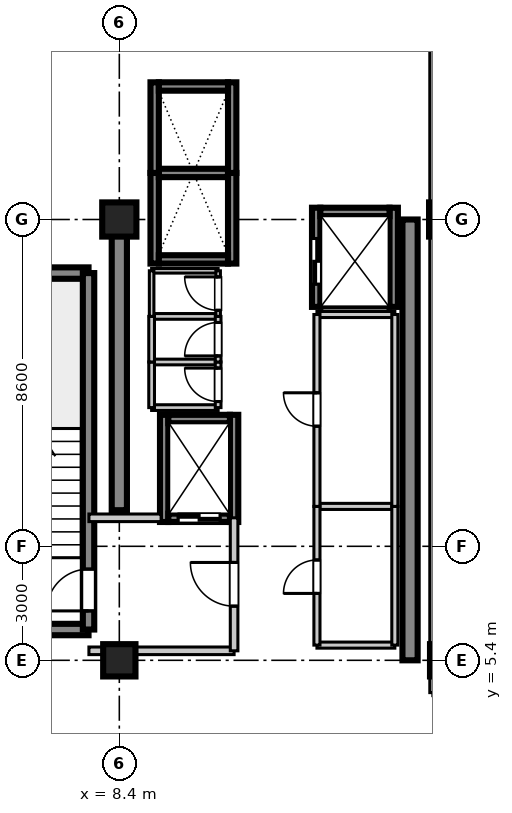
"""IFC4 building model, lengths in metres.
Left out: names, types, materials, properties, quantities, classifications, styles, units other than length and angle.
Written with IfcOpenShell. Run it as: python <this file> out.ifc"""

import sys

from ifc_helpers import new_model, si_unit, direction, frame, frame_2d, origin, origin_2d, place, context, subcontext, project, spatial, rectangle, extrude, source, transform, mapped, element, fill, save


model = new_model("IFC4")
c1 = context("Model", 3, precision=1e-05, world=origin(), true_north=direction((0.0, 1.0)))
c2 = subcontext(c1, "Body", "Model", "MODEL_VIEW")
j1 = project(units=[si_unit("LENGTHUNIT", "METRE"), si_unit("PLANEANGLEUNIT", "RADIAN")], contexts=[c1])
p1 = place(None, origin())
s1 = spatial("IfcSite", under=j1, at=p1, CompositionType="ELEMENT")
p2 = place(p1, origin())
s2 = spatial("IfcBuilding", under=s1, at=p2, CompositionType="ELEMENT")
p3 = place(p2, frame((0.0, 0.0, 281.3)))
s3 = spatial("IfcBuildingStorey", under=s2, at=p3, CompositionType="ELEMENT", Elevation=281.3)
m1 = source(origin(), c2, "Body", "SweptSolid", [
    extrude(rectangle(XDim=0.85, YDim=0.85, at=origin_2d()), origin(), (0.0, 0.0, 1.0), 3.705),
])
p4 = place(p3, frame((8.4, 5.4, 0.0), z_axis=(0.0, 0.0, 1.0), x_axis=(1.0, 0.0, 0.0)))
e1 = element("IfcColumn", 1, at=p4, inside=s3, PredefinedType="PILASTER", context=c2, shape_type="MappedRepresentation", body=[
    mapped(m1, transform((0.0, 0.0, 0.0), scale=1.0)),
])
m2 = source(origin(), c2, "Body", "SweptSolid", [
    extrude(rectangle(XDim=0.9, YDim=0.9, at=origin_2d()), origin(), (0.0, 0.0, 1.0), 3.705),
])
p5 = place(p3, frame((8.4, 17.0, 0.0), z_axis=(0.0, 0.0, 1.0), x_axis=(1.0, 0.0, 0.0)))
e2 = element("IfcColumn", 2, at=p5, inside=s3, PredefinedType="COLUMN", context=c2, shape_type="MappedRepresentation", body=[
    mapped(m2, transform((0.0, 0.0, 0.0), scale=1.0)),
])
p6 = place(p3, frame((17.0, 5.4, 0.0), z_axis=(0.0, 0.0, 1.0), x_axis=(1.0, 0.0, 0.0)))
e3 = element("IfcColumn", 3, at=p6, inside=s3, PredefinedType="PILASTER", context=c2, shape_type="MappedRepresentation", body=[
    mapped(m1, transform((0.0, 0.0, 0.0), scale=1.0)),
])
p7 = place(p3, frame((17.0, 17.0, 0.0), z_axis=(0.0, 0.0, 1.0), x_axis=(1.0, 0.0, 0.0)))
e4 = element("IfcColumn", 4, at=p7, inside=s3, PredefinedType="COLUMN", context=c2, shape_type="MappedRepresentation", body=[
    mapped(m2, transform((0.0, 0.0, 0.0), scale=1.0)),
])
m3 = source(origin(), c2, "Body", "SweptSolid", [
    extrude(rectangle(XDim=7.65, YDim=0.4, at=frame_2d((3.825, 0.0))), origin(), (0.0, 0.0, 1.0), 3.45),
])
p8 = place(p3, frame((8.4, 9.35, 0.0), z_axis=(0.0, 0.0, 1.0), x_axis=(0.0, 1.0, 0.0)))
e5 = element("IfcWall", 5, at=p8, inside=s3, PredefinedType="SHEAR", context=c2, shape_type="MappedRepresentation", body=[
    mapped(m3, transform((0.0, 0.0, 0.0), scale=1.0)),
])
m4 = source(origin(), c2, "Body", "SweptSolid", [
    extrude(rectangle(XDim=11.6, YDim=0.4, at=frame_2d((5.8, 0.0))), origin(), (0.0, 0.0, 1.0), 3.45),
])
p9 = place(p3, frame((16.05, 5.4, 0.0), z_axis=(0.0, 0.0, 1.0), x_axis=(0.0, 1.0, 0.0)))
e6 = element("IfcWall", 6, at=p9, inside=s3, PredefinedType="SHEAR", context=c2, shape_type="MappedRepresentation", body=[
    mapped(m4, transform((0.0, 0.0, 0.0), scale=1.0)),
])
m5 = source(origin(), c2, "Body", "SweptSolid", [
    extrude(rectangle(XDim=3.98, YDim=0.3, at=frame_2d((1.99, 0.0))), origin(), (0.0, 0.0, 1.0), 3.45),
])
for number, where, z_axis, x_axis in (
    (7, (3.61, 6.21, 0.0), (0.0, 0.0, 1.0), (1.0, 0.0, 0.0)),
    (8, (3.61, 15.59, 0.0), (0.0, 0.0, 1.0), (1.0, 0.0, 0.0)),
):
    element("IfcWall", number, at=place(p3, frame(where, z_axis=z_axis, x_axis=x_axis)), inside=s3, PredefinedType="SHEAR", context=c2, shape_type="MappedRepresentation", body=[
        mapped(m5, transform((0.0, 0.0, 0.0), scale=1.0)),
    ])
m6 = source(origin(), c2, "Body", "SweptSolid", [
    extrude(rectangle(XDim=9.38, YDim=0.3, at=frame_2d((4.69, 0.0))), origin(), (0.0, 0.0, 1.0), 3.45),
])
p10 = place(p3, frame((7.59, 6.21, 0.0), z_axis=(0.0, 0.0, 1.0), x_axis=(0.0, 1.0, 0.0)))
e9 = element("IfcWall", 9, at=p10, inside=s3, PredefinedType="SHEAR", context=c2, shape_type="MappedRepresentation", body=[
    mapped(m6, transform((0.0, 0.0, 0.0), scale=1.0)),
])
p11 = place(p10, frame((0.49, 0.0, 0.0)))
e10 = element("IfcOpeningElement", 10, at=p11, cuts=e9, PredefinedType="OPENING", context=c2, shape_type="SweptSolid", body=[
    extrude(rectangle(XDim=1.1, YDim=2.15, at=frame_2d((0.55, 1.075))), frame((0.0, 0.16, 0.0), z_axis=(0.0, -1.0, 0.0), x_axis=(1.0, 0.0, 0.0)), (0.0, 0.0, 1.0), 0.32),
])
m7 = source(origin(), c2, "Body", "SweptSolid", [
    extrude(rectangle(XDim=2.385, YDim=0.22, at=frame_2d((1.192, 0.0))), origin(), (0.0, 0.0, 1.0), 3.45),
])
for number, where, z_axis, x_axis in (
    (11, (9.33, 15.84, 0.0), (0.0, 0.0, 1.0), (0.0, 1.0, 0.0)),
    (12, (11.37, 15.84, 0.0), (0.0, 0.0, 1.0), (0.0, 1.0, 0.0)),
):
    element("IfcWall", number, at=place(p3, frame(where, z_axis=z_axis, x_axis=x_axis)), inside=s3, PredefinedType="SHEAR", context=c2, shape_type="MappedRepresentation", body=[
        mapped(m7, transform((0.0, 0.0, 0.0), scale=1.0)),
    ])
m8 = source(origin(), c2, "Body", "SweptSolid", [
    extrude(rectangle(XDim=1.82, YDim=0.22, at=frame_2d((0.91, 0.0))), origin(), (0.0, 0.0, 1.0), 3.45),
])
p12 = place(p3, frame((9.44, 15.95, 0.0), z_axis=(0.0, 0.0, 1.0), x_axis=(1.0, 0.0, 0.0)))
e13 = element("IfcWall", 13, at=p12, inside=s3, PredefinedType="SHEAR", context=c2, shape_type="MappedRepresentation", body=[
    mapped(m8, transform((0.0, 0.0, 0.0), scale=1.0)),
])
m9 = source(origin(), c2, "Body", "SweptSolid", [
    extrude(rectangle(XDim=1.82, YDim=0.22, at=frame_2d((0.91, 0.0))), origin(), (0.0, 0.0, 1.0), 3.75),
])
p13 = place(p3, frame((9.44, 18.225, 0.0), z_axis=(0.0, 0.0, 1.0), x_axis=(1.0, 0.0, 0.0)))
e14 = element("IfcWall", 14, at=p13, inside=s3, PredefinedType="SHEAR", context=c2, shape_type="MappedRepresentation", body=[
    mapped(m9, transform((0.0, 0.0, 0.0), scale=1.0)),
])
for number, where, z_axis, x_axis in (
    (15, (9.33, 18.225, 0.0), (0.0, 0.0, 1.0), (0.0, 1.0, 0.0)),
    (16, (11.37, 18.225, 0.0), (0.0, 0.0, 1.0), (0.0, 1.0, 0.0)),
):
    element("IfcWall", number, at=place(p3, frame(where, z_axis=z_axis, x_axis=x_axis)), inside=s3, PredefinedType="SHEAR", context=c2, shape_type="MappedRepresentation", body=[
        mapped(m7, transform((0.0, 0.0, 0.0), scale=1.0)),
    ])
p14 = place(p3, frame((9.44, 20.5, 0.0), z_axis=(0.0, 0.0, 1.0), x_axis=(1.0, 0.0, 0.0)))
e17 = element("IfcWall", 17, at=p14, inside=s3, PredefinedType="SHEAR", context=c2, shape_type="MappedRepresentation", body=[
    mapped(m8, transform((0.0, 0.0, 0.0), scale=1.0)),
])
m10 = source(origin(), c2, "Body", "SweptSolid", [
    extrude(rectangle(XDim=2.82, YDim=0.22, at=frame_2d((1.41, 0.0))), origin(), (0.0, 0.0, 1.0), 3.45),
])
for number, where, z_axis, x_axis in (
    (18, (9.58, 9.04, 0.0), (0.0, 0.0, 1.0), (0.0, 1.0, 0.0)),
    (19, (11.42, 9.04, 0.0), (0.0, 0.0, 1.0), (0.0, 1.0, 0.0)),
):
    element("IfcWall", number, at=place(p3, frame(where, z_axis=z_axis, x_axis=x_axis)), inside=s3, PredefinedType="SHEAR", context=c2, shape_type="MappedRepresentation", body=[
        mapped(m10, transform((0.0, 0.0, 0.0), scale=1.0)),
    ])
m11 = source(origin(), c2, "Body", "SweptSolid", [
    extrude(rectangle(XDim=1.62, YDim=0.22, at=frame_2d((0.81, 0.0))), origin(), (0.0, 0.0, 1.0), 3.45),
])
p15 = place(p3, frame((9.69, 9.15, 0.0), z_axis=(0.0, 0.0, 1.0), x_axis=(1.0, 0.0, 0.0)))
e20 = element("IfcWall", 20, at=p15, inside=s3, PredefinedType="SHEAR", context=c2, shape_type="MappedRepresentation", body=[
    mapped(m11, transform((0.0, 0.0, 0.0), scale=1.0)),
])
p16 = place(p15, frame((0.26, 0.0, 0.0)))
e21 = element("IfcOpeningElement", 21, at=p16, cuts=e20, PredefinedType="OPENING", context=c2, shape_type="SweptSolid", body=[
    extrude(rectangle(XDim=1.1, YDim=2.2, at=frame_2d((0.55, 1.1))), frame((0.0, 0.12, 0.0), z_axis=(0.0, -1.0, 0.0), x_axis=(1.0, 0.0, 0.0)), (0.0, 0.0, 1.0), 0.24),
])
p17 = place(p3, frame((9.69, 11.75, 0.0), z_axis=(0.0, 0.0, 1.0), x_axis=(1.0, 0.0, 0.0)))
e22 = element("IfcWall", 22, at=p17, inside=s3, PredefinedType="SHEAR", context=c2, shape_type="MappedRepresentation", body=[
    mapped(m11, transform((0.0, 0.0, 0.0), scale=1.0)),
])
m12 = source(origin(), c2, "Body", "SweptSolid", [
    extrude(rectangle(XDim=2.61, YDim=0.22, at=frame_2d((1.305, 0.0))), origin(), (0.0, 0.0, 1.0), 3.45),
])
p18 = place(p3, frame((13.58, 14.7, 0.0), z_axis=(0.0, 0.0, 1.0), x_axis=(0.0, 1.0, 0.0)))
e23 = element("IfcWall", 23, at=p18, inside=s3, PredefinedType="SHEAR", context=c2, shape_type="MappedRepresentation", body=[
    mapped(m12, transform((0.0, 0.0, 0.0), scale=1.0)),
])
p19 = place(p18, frame((0.6, 0.0, 0.0)))
e24 = element("IfcOpeningElement", 24, at=p19, cuts=e23, PredefinedType="OPENING", context=c2, shape_type="SweptSolid", body=[
    extrude(rectangle(XDim=1.2, YDim=2.2, at=frame_2d((0.6, 1.1))), frame((0.0, 0.12, 0.0), z_axis=(0.0, -1.0, 0.0), x_axis=(1.0, 0.0, 0.0)), (0.0, 0.0, 1.0), 0.24),
])
p20 = place(p3, frame((15.62, 14.7, 0.0), z_axis=(0.0, 0.0, 1.0), x_axis=(0.0, 1.0, 0.0)))
e25 = element("IfcWall", 25, at=p20, inside=s3, PredefinedType="SHEAR", context=c2, shape_type="MappedRepresentation", body=[
    mapped(m12, transform((0.0, 0.0, 0.0), scale=1.0)),
])
p21 = place(p3, frame((13.69, 17.2, 0.0), z_axis=(0.0, 0.0, 1.0), x_axis=(1.0, 0.0, 0.0)))
e26 = element("IfcWall", 26, at=p21, inside=s3, PredefinedType="SHEAR", context=c2, shape_type="MappedRepresentation", body=[
    mapped(m8, transform((0.0, 0.0, 0.0), scale=1.0)),
])
m13 = source(origin(), c2, "Body", "SweptSolid", [
    extrude(rectangle(XDim=3.82, YDim=0.2, at=frame_2d((1.91, 0.0))), origin(), (0.0, 0.0, 1.0), 2.79),
])
p22 = place(p3, frame((7.6, 5.65, 0.0), z_axis=(0.0, 0.0, 1.0), x_axis=(1.0, 0.0, 0.0)))
e27 = element("IfcWall", 27, at=p22, inside=s3, PredefinedType="PARTITIONING", context=c2, shape_type="MappedRepresentation", body=[
    mapped(m13, transform((0.0, 0.0, 0.0), scale=1.0)),
])
m14 = source(origin(), c2, "Body", "SweptSolid", [
    extrude(rectangle(XDim=1.9, YDim=0.2, at=frame_2d((0.95, 0.0))), origin(), (0.0, 0.0, 1.0), 2.79),
])
p23 = place(p3, frame((7.6, 9.15, 0.0), z_axis=(0.0, 0.0, 1.0), x_axis=(1.0, 0.0, 0.0)))
e28 = element("IfcWall", 28, at=p23, inside=s3, PredefinedType="PARTITIONING", context=c2, shape_type="MappedRepresentation", body=[
    mapped(m14, transform((0.0, 0.0, 0.0), scale=1.0)),
])
m15 = source(origin(), c2, "Body", "SweptSolid", [
    extrude(rectangle(XDim=3.5, YDim=0.2, at=frame_2d((1.75, 0.0))), origin(), (0.0, 0.0, 1.0), 2.79),
])
p24 = place(p3, frame((11.42, 5.65, 0.0), z_axis=(0.0, 0.0, 1.0), x_axis=(0.0, 1.0, 0.0)))
e29 = element("IfcWall", 29, at=p24, inside=s3, PredefinedType="PARTITIONING", context=c2, shape_type="MappedRepresentation", body=[
    mapped(m15, transform((0.0, 0.0, 0.0), scale=1.0)),
])
p25 = place(p24, frame((1.175, 0.0, 0.0)))
e30 = element("IfcOpeningElement", 30, at=p25, cuts=e29, PredefinedType="OPENING", context=c2, shape_type="SweptSolid", body=[
    extrude(rectangle(XDim=1.15, YDim=2.15, at=frame_2d((0.575, 1.075))), frame((0.0, 0.11, 0.0), z_axis=(0.0, -1.0, 0.0), x_axis=(1.0, 0.0, 0.0)), (0.0, 0.0, 1.0), 0.22),
])
m16 = source(origin(), c2, "Body", "SweptSolid", [
    extrude(rectangle(XDim=1.75, YDim=0.15, at=frame_2d((0.875, 0.0))), origin(), (0.0, 0.0, 1.0), 2.79),
])
for number, where, z_axis, x_axis in (
    (31, (9.25, 12.05, 0.0), (0.0, 0.0, 1.0), (1.0, 0.0, 0.0)),
    (32, (9.25, 13.25, 0.0), (0.0, 0.0, 1.0), (1.0, 0.0, 0.0)),
):
    element("IfcWall", number, at=place(p3, frame(where, z_axis=z_axis, x_axis=x_axis)), inside=s3, PredefinedType="PARTITIONING", context=c2, shape_type="MappedRepresentation", body=[
        mapped(m16, transform((0.0, 0.0, 0.0), scale=1.0)),
    ])
m17 = source(origin(), c2, "Body", "SweptSolid", [
    extrude(rectangle(XDim=1.2, YDim=0.15, at=frame_2d((0.6, 0.0))), origin(), (0.0, 0.0, 1.0), 2.79),
])
p26 = place(p3, frame((9.25, 12.05, 0.0), z_axis=(0.0, 0.0, 1.0), x_axis=(0.0, 1.0, 0.0)))
e33 = element("IfcWall", 33, at=p26, inside=s3, PredefinedType="PARTITIONING", context=c2, shape_type="MappedRepresentation", body=[
    mapped(m17, transform((0.0, 0.0, 0.0), scale=1.0)),
])
p27 = place(p3, frame((11.0, 12.05, 0.0), z_axis=(0.0, 0.0, 1.0), x_axis=(0.0, 1.0, 0.0)))
e34 = element("IfcWall", 34, at=p27, inside=s3, PredefinedType="PARTITIONING", context=c2, shape_type="MappedRepresentation", body=[
    mapped(m17, transform((0.0, 0.0, 0.0), scale=1.0)),
])
p28 = place(p27, frame((0.16, 0.0, 0.0)))
e35 = element("IfcOpeningElement", 35, at=p28, cuts=e34, PredefinedType="OPENING", context=c2, shape_type="SweptSolid", body=[
    extrude(rectangle(XDim=0.88, YDim=2.1, at=frame_2d((0.44, 1.05))), frame((0.0, 0.085, 0.0), z_axis=(0.0, -1.0, 0.0), x_axis=(1.0, 0.0, 0.0)), (0.0, 0.0, 1.0), 0.17),
])
p29 = place(p3, frame((9.25, 14.45, 0.0), z_axis=(0.0, 0.0, 1.0), x_axis=(1.0, 0.0, 0.0)))
e36 = element("IfcWall", 36, at=p29, inside=s3, PredefinedType="PARTITIONING", context=c2, shape_type="MappedRepresentation", body=[
    mapped(m16, transform((0.0, 0.0, 0.0), scale=1.0)),
])
p30 = place(p3, frame((9.25, 13.25, 0.0), z_axis=(0.0, 0.0, 1.0), x_axis=(0.0, 1.0, 0.0)))
e37 = element("IfcWall", 37, at=p30, inside=s3, PredefinedType="PARTITIONING", context=c2, shape_type="MappedRepresentation", body=[
    mapped(m17, transform((0.0, 0.0, 0.0), scale=1.0)),
])
p31 = place(p3, frame((11.0, 13.25, 0.0), z_axis=(0.0, 0.0, 1.0), x_axis=(0.0, 1.0, 0.0)))
e38 = element("IfcWall", 38, at=p31, inside=s3, PredefinedType="PARTITIONING", context=c2, shape_type="MappedRepresentation", body=[
    mapped(m17, transform((0.0, 0.0, 0.0), scale=1.0)),
])
p32 = place(p31, frame((0.16, 0.0, 0.0)))
e39 = element("IfcOpeningElement", 39, at=p32, cuts=e38, PredefinedType="OPENING", context=c2, shape_type="SweptSolid", body=[
    extrude(rectangle(XDim=0.88, YDim=2.1, at=frame_2d((0.44, 1.05))), frame((0.0, 0.085, 0.0), z_axis=(0.0, -1.0, 0.0), x_axis=(1.0, 0.0, 0.0)), (0.0, 0.0, 1.0), 0.17),
])
m18 = source(origin(), c2, "Body", "SweptSolid", [
    extrude(rectangle(XDim=1.75, YDim=0.12, at=frame_2d((0.875, 0.0))), origin(), (0.0, 0.0, 1.0), 2.79),
])
p33 = place(p3, frame((9.25, 15.65, 0.0), z_axis=(0.0, 0.0, 1.0), x_axis=(1.0, 0.0, 0.0)))
e40 = element("IfcWall", 40, at=p33, inside=s3, PredefinedType="PARTITIONING", context=c2, shape_type="MappedRepresentation", body=[
    mapped(m18, transform((0.0, 0.0, 0.0), scale=1.0)),
])
m19 = source(origin(), c2, "Body", "SweptSolid", [
    extrude(rectangle(XDim=1.2, YDim=0.12, at=frame_2d((0.6, 0.0))), origin(), (0.0, 0.0, 1.0), 2.79),
])
p34 = place(p3, frame((9.25, 14.45, 0.0), z_axis=(0.0, 0.0, 1.0), x_axis=(0.0, 1.0, 0.0)))
e41 = element("IfcWall", 41, at=p34, inside=s3, PredefinedType="PARTITIONING", context=c2, shape_type="MappedRepresentation", body=[
    mapped(m19, transform((0.0, 0.0, 0.0), scale=1.0)),
])
p35 = place(p3, frame((11.0, 14.45, 0.0), z_axis=(0.0, 0.0, 1.0), x_axis=(0.0, 1.0, 0.0)))
e42 = element("IfcWall", 42, at=p35, inside=s3, PredefinedType="PARTITIONING", context=c2, shape_type="MappedRepresentation", body=[
    mapped(m19, transform((0.0, 0.0, 0.0), scale=1.0)),
])
p36 = place(p35, frame((0.16, 0.0, 0.0)))
e43 = element("IfcOpeningElement", 43, at=p36, cuts=e42, PredefinedType="OPENING", context=c2, shape_type="SweptSolid", body=[
    extrude(rectangle(XDim=0.88, YDim=2.1, at=frame_2d((0.44, 1.05))), frame((0.0, 0.07, 0.0), z_axis=(0.0, -1.0, 0.0), x_axis=(1.0, 0.0, 0.0)), (0.0, 0.0, 1.0), 0.14),
])
m20 = source(origin(), c2, "Body", "SweptSolid", [
    extrude(rectangle(XDim=2.05, YDim=0.16, at=frame_2d((1.025, 0.0))), origin(), (0.0, 0.0, 1.0), 2.79),
])
for number, where, z_axis, x_axis in (
    (44, (13.6, 5.8, 0.0), (0.0, 0.0, 1.0), (1.0, 0.0, 0.0)),
    (45, (13.6, 9.45, 0.0), (0.0, 0.0, 1.0), (1.0, 0.0, 0.0)),
):
    element("IfcWall", number, at=place(p3, frame(where, z_axis=z_axis, x_axis=x_axis)), inside=s3, PredefinedType="PARTITIONING", context=c2, shape_type="MappedRepresentation", body=[
        mapped(m20, transform((0.0, 0.0, 0.0), scale=1.0)),
    ])
m21 = source(origin(), c2, "Body", "SweptSolid", [
    extrude(rectangle(XDim=3.65, YDim=0.16, at=frame_2d((1.825, 0.0))), origin(), (0.0, 0.0, 1.0), 2.79),
])
p37 = place(p3, frame((13.6, 5.8, 0.0), z_axis=(0.0, 0.0, 1.0), x_axis=(0.0, 1.0, 0.0)))
e46 = element("IfcWall", 46, at=p37, inside=s3, PredefinedType="PARTITIONING", context=c2, shape_type="MappedRepresentation", body=[
    mapped(m21, transform((0.0, 0.0, 0.0), scale=1.0)),
])
p38 = place(p37, frame((1.36, 0.0, 0.0)))
e47 = element("IfcOpeningElement", 47, at=p38, cuts=e46, PredefinedType="OPENING", context=c2, shape_type="SweptSolid", body=[
    extrude(rectangle(XDim=0.88, YDim=2.1, at=frame_2d((0.44, 1.05))), frame((0.0, 0.09, 0.0), z_axis=(0.0, -1.0, 0.0), x_axis=(1.0, 0.0, 0.0)), (0.0, 0.0, 1.0), 0.18),
])
p39 = place(p3, frame((15.65, 5.8, 0.0), z_axis=(0.0, 0.0, 1.0), x_axis=(0.0, 1.0, 0.0)))
e48 = element("IfcWall", 48, at=p39, inside=s3, PredefinedType="PARTITIONING", context=c2, shape_type="MappedRepresentation", body=[
    mapped(m21, transform((0.0, 0.0, 0.0), scale=1.0)),
])
p40 = place(p3, frame((13.6, 14.5, 0.0), z_axis=(0.0, 0.0, 1.0), x_axis=(1.0, 0.0, 0.0)))
e49 = element("IfcWall", 49, at=p40, inside=s3, PredefinedType="PARTITIONING", context=c2, shape_type="MappedRepresentation", body=[
    mapped(m20, transform((0.0, 0.0, 0.0), scale=1.0)),
])
m22 = source(origin(), c2, "Body", "SweptSolid", [
    extrude(rectangle(XDim=5.05, YDim=0.16, at=frame_2d((2.525, 0.0))), origin(), (0.0, 0.0, 1.0), 2.79),
])
p41 = place(p3, frame((13.6, 9.45, 0.0), z_axis=(0.0, 0.0, 1.0), x_axis=(0.0, 1.0, 0.0)))
e50 = element("IfcWall", 50, at=p41, inside=s3, PredefinedType="PARTITIONING", context=c2, shape_type="MappedRepresentation", body=[
    mapped(m22, transform((0.0, 0.0, 0.0), scale=1.0)),
])
p42 = place(p41, frame((2.11, 0.0, 0.0)))
e51 = element("IfcOpeningElement", 51, at=p42, cuts=e50, PredefinedType="OPENING", context=c2, shape_type="SweptSolid", body=[
    extrude(rectangle(XDim=0.88, YDim=2.1, at=frame_2d((0.44, 1.05))), frame((0.0, 0.09, 0.0), z_axis=(0.0, -1.0, 0.0), x_axis=(1.0, 0.0, 0.0)), (0.0, 0.0, 1.0), 0.18),
])
p43 = place(p3, frame((15.65, 9.45, 0.0), z_axis=(0.0, 0.0, 1.0), x_axis=(0.0, 1.0, 0.0)))
e52 = element("IfcWall", 52, at=p43, inside=s3, PredefinedType="PARTITIONING", context=c2, shape_type="MappedRepresentation", body=[
    mapped(m22, transform((0.0, 0.0, 0.0), scale=1.0)),
])
m23 = source(origin(), c2, "Body", "SweptSolid", [
    extrude(rectangle(XDim=17.95, YDim=0.16, at=frame_2d((8.975, 0.0))), origin(), (0.0, 0.0, 1.0), 2.79),
])
p44 = place(p3, frame((16.65, 4.55, 0.0), z_axis=(0.0, 0.0, 1.0), x_axis=(0.0, 1.0, 0.0)))
e53 = element("IfcWall", 53, at=p44, inside=s3, PredefinedType="PARTITIONING", context=c2, shape_type="MappedRepresentation", body=[
    mapped(m23, transform((0.0, 0.0, 0.0), scale=1.0)),
])
m24 = source(origin(), c2, "Body", "SweptSolid", [
    extrude(rectangle(XDim=1.1, YDim=2.15, at=frame_2d((0.55, 1.075))), frame((0.0, 0.025, 0.0), z_axis=(0.0, -1.0, 0.0), x_axis=(1.0, 0.0, 0.0)), (0.0, 0.0, 1.0), 0.05),
])
p45 = place(p11, origin())
e54 = element("IfcDoor", 54, at=p45, inside=s3, OperationType="SINGLE_SWING_LEFT", PredefinedType="DOOR", context=c2, shape_type="MappedRepresentation", body=[
    mapped(m24, transform((0.0, 0.0, 0.0), scale=1.0)),
])
fill(e10, e54)
m25 = source(origin(), c2, "Body", "SweptSolid", [
    extrude(rectangle(XDim=1.1, YDim=2.2, at=frame_2d((0.55, 1.1))), frame((0.0, 0.025, 0.0), z_axis=(0.0, -1.0, 0.0), x_axis=(1.0, 0.0, 0.0)), (0.0, 0.0, 1.0), 0.05),
])
p46 = place(p16, frame((1.1, 0.0, 0.0), z_axis=(0.0, 0.0, 1.0), x_axis=(-1.0, 0.0, 0.0)))
e55 = element("IfcDoor", 55, at=p46, inside=s3, OperationType="DOUBLE_DOOR_SLIDING", PredefinedType="DOOR", context=c2, shape_type="MappedRepresentation", body=[
    mapped(m25, transform((0.0, 0.0, 0.0), scale=1.0)),
])
fill(e21, e55)
m26 = source(origin(), c2, "Body", "SweptSolid", [
    extrude(rectangle(XDim=1.2, YDim=2.2, at=frame_2d((0.6, 1.1))), frame((0.0, 0.025, 0.0), z_axis=(0.0, -1.0, 0.0), x_axis=(1.0, 0.0, 0.0)), (0.0, 0.0, 1.0), 0.05),
])
p47 = place(p19, origin())
e56 = element("IfcDoor", 56, at=p47, inside=s3, OperationType="DOUBLE_DOOR_SLIDING", PredefinedType="DOOR", context=c2, shape_type="MappedRepresentation", body=[
    mapped(m26, transform((0.0, 0.0, 0.0), scale=1.0)),
])
fill(e24, e56)
m27 = source(origin(), c2, "Body", "SweptSolid", [
    extrude(rectangle(XDim=1.15, YDim=2.15, at=frame_2d((0.575, 1.075))), frame((0.0, 0.025, 0.0), z_axis=(0.0, -1.0, 0.0), x_axis=(1.0, 0.0, 0.0)), (0.0, 0.0, 1.0), 0.05),
])
p48 = place(p25, frame((1.15, 0.0, 0.0), z_axis=(0.0, 0.0, 1.0), x_axis=(-1.0, 0.0, 0.0)))
e57 = element("IfcDoor", 57, at=p48, inside=s3, OperationType="SINGLE_SWING_RIGHT", PredefinedType="DOOR", context=c2, shape_type="MappedRepresentation", body=[
    mapped(m27, transform((0.0, 0.0, 0.0), scale=1.0)),
])
fill(e30, e57)
m28 = source(origin(), c2, "Body", "SweptSolid", [
    extrude(rectangle(XDim=0.88, YDim=2.1, at=frame_2d((0.44, 1.05))), frame((0.0, 0.025, 0.0), z_axis=(0.0, -1.0, 0.0), x_axis=(1.0, 0.0, 0.0)), (0.0, 0.0, 1.0), 0.05),
])
p49 = place(p28, origin())
e58 = element("IfcDoor", 58, at=p49, inside=s3, OperationType="SINGLE_SWING_RIGHT", PredefinedType="DOOR", context=c2, shape_type="MappedRepresentation", body=[
    mapped(m28, transform((0.0, 0.0, 0.0), scale=1.0)),
])
fill(e35, e58)
p50 = place(p32, origin())
e59 = element("IfcDoor", 59, at=p50, inside=s3, OperationType="SINGLE_SWING_LEFT", PredefinedType="DOOR", context=c2, shape_type="MappedRepresentation", body=[
    mapped(m28, transform((0.0, 0.0, 0.0), scale=1.0)),
])
fill(e39, e59)
p51 = place(p36, origin())
e60 = element("IfcDoor", 60, at=p51, inside=s3, OperationType="SINGLE_SWING_RIGHT", PredefinedType="DOOR", context=c2, shape_type="MappedRepresentation", body=[
    mapped(m28, transform((0.0, 0.0, 0.0), scale=1.0)),
])
fill(e43, e60)
p52 = place(p38, frame((0.88, 0.0, 0.0), z_axis=(0.0, 0.0, 1.0), x_axis=(-1.0, 0.0, 0.0)))
e61 = element("IfcDoor", 61, at=p52, inside=s3, OperationType="SINGLE_SWING_LEFT", PredefinedType="DOOR", context=c2, shape_type="MappedRepresentation", body=[
    mapped(m28, transform((0.0, 0.0, 0.0), scale=1.0)),
])
fill(e47, e61)
p53 = place(p42, frame((0.88, 0.0, 0.0), z_axis=(0.0, 0.0, 1.0), x_axis=(-1.0, 0.0, 0.0)))
e62 = element("IfcDoor", 62, at=p53, inside=s3, OperationType="SINGLE_SWING_RIGHT", PredefinedType="DOOR", context=c2, shape_type="MappedRepresentation", body=[
    mapped(m28, transform((0.0, 0.0, 0.0), scale=1.0)),
])
fill(e51, e62)
save(model, sys.argv[1])
